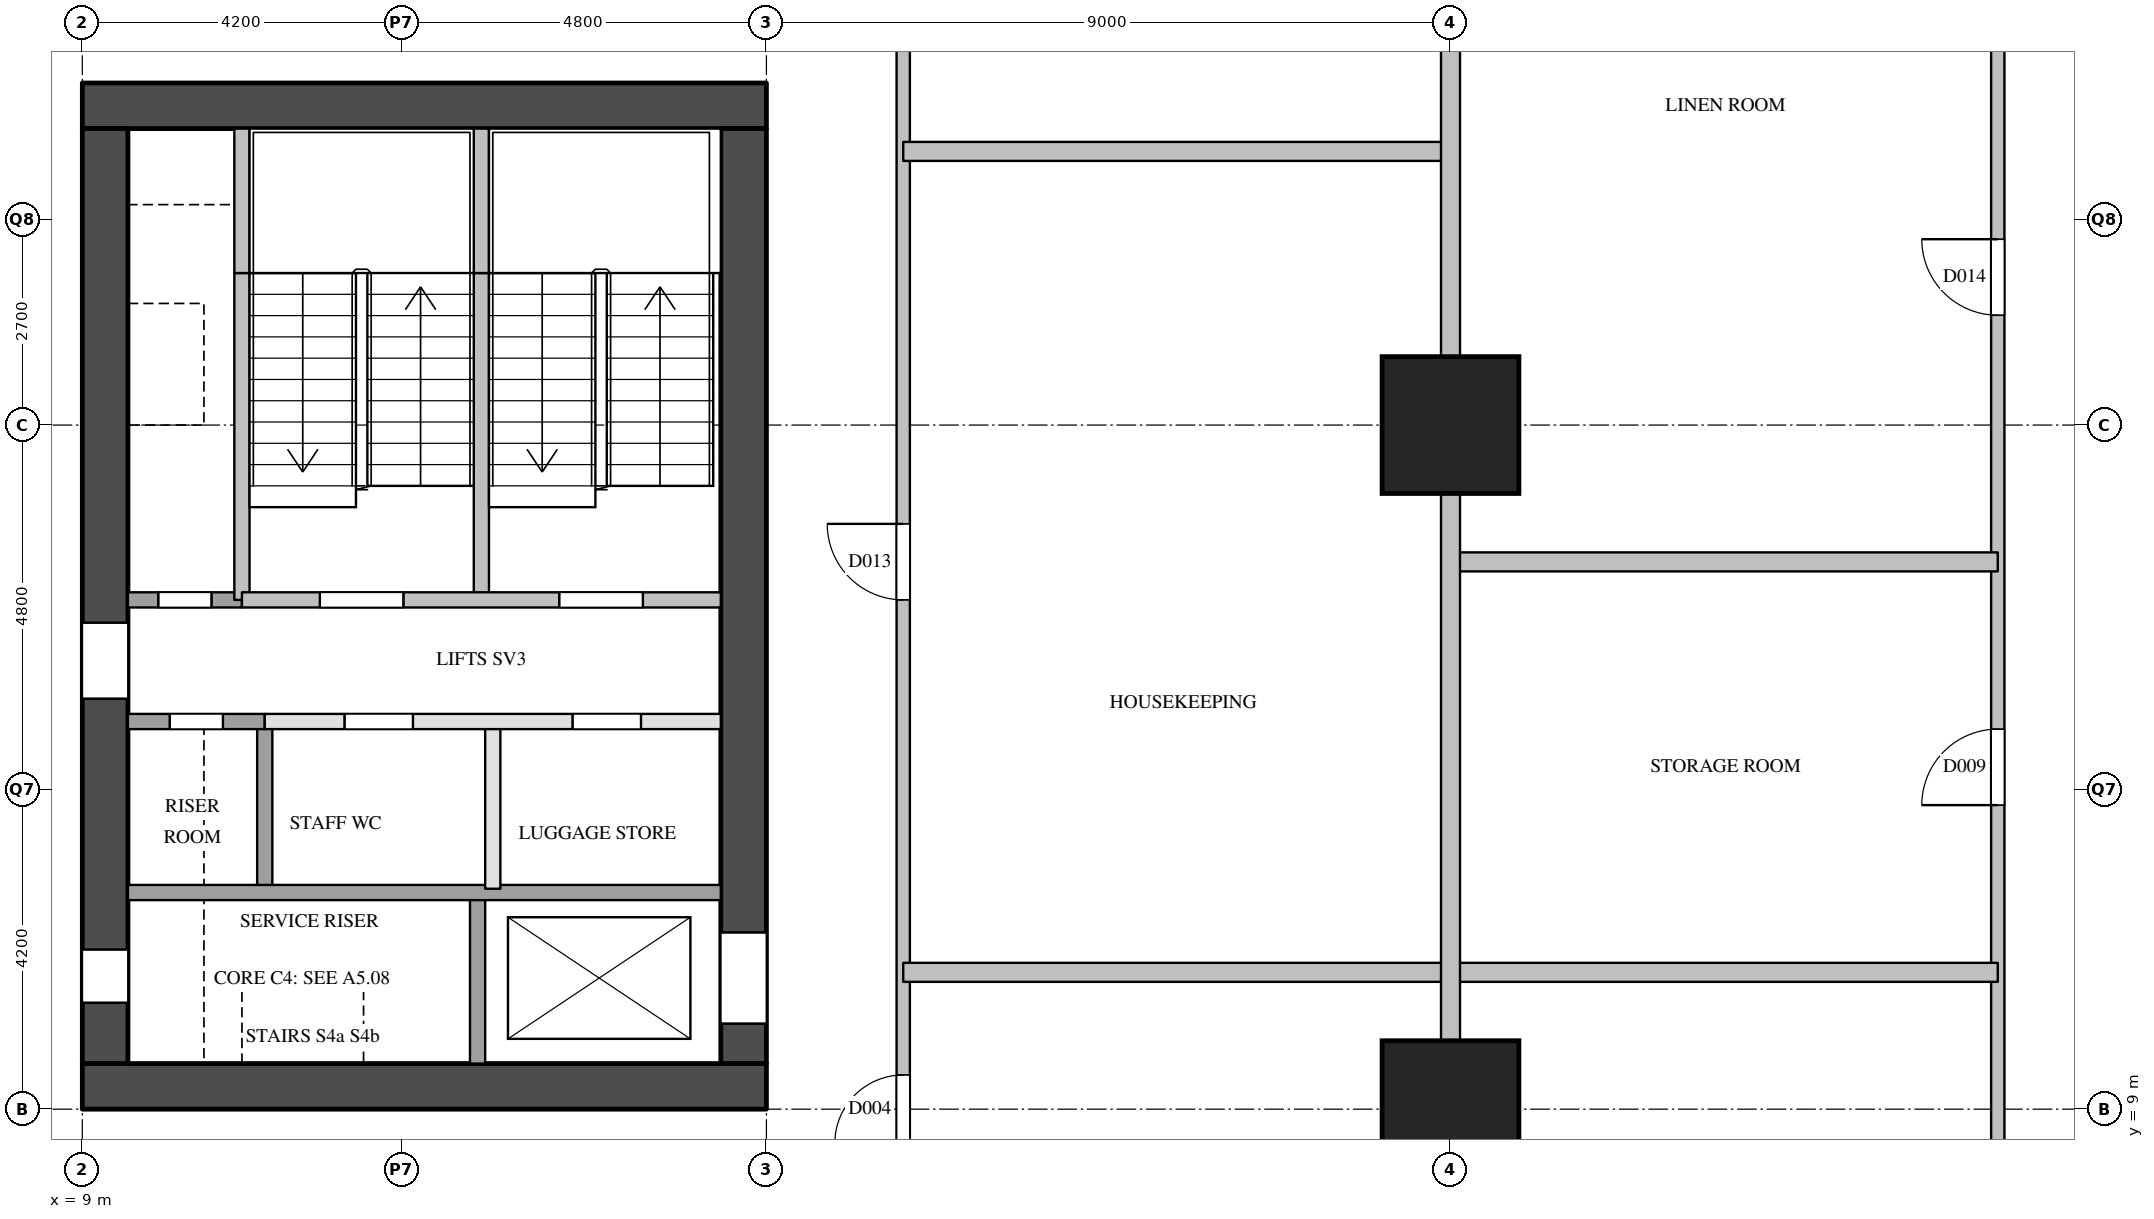
"""IFC4 building model, lengths in metres.
Left out: names, types, materials, properties, quantities, classifications, styles, units other than length and angle.
Written with IfcOpenShell. Run it as: python <this file> out.ifc"""

import sys

from ifc_helpers import new_model, si_unit, direction, frame, frame_2d, origin, origin_2d, place, context, subcontext, project, spatial, rectangle, extrude, element, fill, save


model = new_model("IFC4")
c1 = context("Model", 3, precision=1e-05, world=origin(), true_north=direction((0.0, 1.0)))
c2 = subcontext(c1, "Body", "Model", "MODEL_VIEW")
j1 = project(units=[si_unit("LENGTHUNIT", "METRE"), si_unit("PLANEANGLEUNIT", "RADIAN")], contexts=[c1])
p1 = place(None, origin())
s1 = spatial("IfcSite", under=j1, at=p1, CompositionType="ELEMENT")
p2 = place(p1, origin())
s2 = spatial("IfcBuilding", under=s1, at=p2, CompositionType="ELEMENT")
p3 = place(p2, frame((0.0, 0.0, 31.0)))
s3 = spatial("IfcBuildingStorey", under=s2, at=p3, CompositionType="ELEMENT", Elevation=31.0)
for number, where, z_axis, x_axis in (
    (1, (27.0, 9.0, 0.0), (0.0, 0.0, 1.0), (1.0, 0.0, 0.0)),
    (2, (27.0, 18.0, 0.0), (0.0, 0.0, 1.0), (1.0, 0.0, 0.0)),
):
    element("IfcColumn", number, at=place(p3, frame(where, z_axis=z_axis, x_axis=x_axis)), inside=s3, PredefinedType="COLUMN", context=c2, shape_type="SweptSolid", body=[
        extrude(rectangle(XDim=1.8, YDim=1.8, at=origin_2d()), origin(), (0.0, 0.0, 1.0), 3.8),
    ])
for number, where, z_axis, x_axis in (
    (3, (9.0, 9.3, 0.0), (0.0, 0.0, 1.0), (1.0, 0.0, 0.0)),
    (4, (9.0, 22.2, 0.0), (0.0, 0.0, 1.0), (1.0, 0.0, 0.0)),
):
    element("IfcWall", number, at=place(p3, frame(where, z_axis=z_axis, x_axis=x_axis)), inside=s3, PredefinedType="SHEAR", context=c2, shape_type="SweptSolid", body=[
        extrude(rectangle(XDim=9.0, YDim=0.6, at=frame_2d((4.5, 0.0))), origin(), (0.0, 0.0, 1.0), 3.5),
    ])
p4 = place(p3, frame((9.3, 9.6, 0.0), z_axis=(0.0, 0.0, 1.0), x_axis=(0.0, 1.0, 0.0)))
e5 = element("IfcWall", 5, at=p4, inside=s3, PredefinedType="SHEAR", context=c2, shape_type="SweptSolid", body=[
    extrude(rectangle(XDim=12.3, YDim=0.6, at=frame_2d((6.15, 0.0))), origin(), (0.0, 0.0, 1.0), 3.5),
])
p5 = place(p4, frame((0.8, 0.0, 0.0)))
e6 = element("IfcOpeningElement", 6, at=p5, cuts=e5, PredefinedType="OPENING", context=c2, shape_type="SweptSolid", body=[
    extrude(rectangle(XDim=0.7, YDim=2.1, at=frame_2d((0.35, 1.05))), frame((0.0, 0.31, 0.0), z_axis=(0.0, -1.0, 0.0), x_axis=(1.0, 0.0, 0.0)), (0.0, 0.0, 1.0), 0.62),
])
p6 = place(p4, frame((4.8, 0.0, 0.0)))
e7 = element("IfcOpeningElement", 7, at=p6, cuts=e5, PredefinedType="OPENING", context=c2, shape_type="SweptSolid", body=[
    extrude(rectangle(XDim=1.0, YDim=2.1, at=frame_2d((0.5, 1.05))), frame((0.0, 0.31, 0.0), z_axis=(0.0, -1.0, 0.0), x_axis=(1.0, 0.0, 0.0)), (0.0, 0.0, 1.0), 0.62),
])
p7 = place(p3, frame((17.7, 9.6, 0.0), z_axis=(0.0, 0.0, 1.0), x_axis=(0.0, 1.0, 0.0)))
e8 = element("IfcWall", 8, at=p7, inside=s3, PredefinedType="SHEAR", context=c2, shape_type="SweptSolid", body=[
    extrude(rectangle(XDim=12.3, YDim=0.6, at=frame_2d((6.15, 0.0))), origin(), (0.0, 0.0, 1.0), 3.5),
])
p8 = place(p7, frame((0.525, 0.0, 0.0)))
e9 = element("IfcOpeningElement", 9, at=p8, cuts=e8, PredefinedType="OPENING", context=c2, shape_type="SweptSolid", body=[
    extrude(rectangle(XDim=1.2, YDim=2.1, at=frame_2d((0.6, 1.05))), frame((0.0, 0.31, 0.0), z_axis=(0.0, -1.0, 0.0), x_axis=(1.0, 0.0, 0.0)), (0.0, 0.0, 1.0), 0.62),
])
p9 = place(p3, frame((11.1, 15.7, 0.0), z_axis=(0.0, 0.0, 1.0), x_axis=(0.0, 1.0, 0.0)))
e10 = element("IfcWall", 10, at=p9, inside=s3, PredefinedType="SOLIDWALL", context=c2, shape_type="SweptSolid", body=[
    extrude(rectangle(XDim=4.3, YDim=0.2, at=frame_2d((2.15, 0.0))), origin(), (0.0, 0.0, 1.0), 3.5),
])
p10 = place(p3, frame((11.1, 20.0, 0.0), z_axis=(0.0, 0.0, 1.0), x_axis=(0.0, 1.0, 0.0)))
e11 = element("IfcWall", 11, at=p10, inside=s3, PredefinedType="SOLIDWALL", context=c2, shape_type="SweptSolid", body=[
    extrude(rectangle(XDim=1.9, YDim=0.2, at=frame_2d((0.95, 0.0))), origin(), (0.0, 0.0, 1.0), 3.5),
])
p11 = place(p3, frame((11.4, 11.9, 0.0), z_axis=(0.0, 0.0, 1.0), x_axis=(0.0, 1.0, 0.0)))
e12 = element("IfcWall", 12, at=p11, inside=s3, PredefinedType="SOLIDWALL", context=c2, shape_type="SweptSolid", body=[
    extrude(rectangle(XDim=2.2, YDim=0.2, at=frame_2d((1.1, 0.0))), origin(), (0.0, 0.0, 1.0), 3.5),
])
p12 = place(p3, frame((14.2, 9.6, 0.0), z_axis=(0.0, 0.0, 1.0), x_axis=(0.0, 1.0, 0.0)))
e13 = element("IfcWall", 13, at=p12, inside=s3, PredefinedType="SOLIDWALL", context=c2, shape_type="SweptSolid", body=[
    extrude(rectangle(XDim=2.3, YDim=0.2, at=frame_2d((1.15, 0.0))), origin(), (0.0, 0.0, 1.0), 3.5),
])
p13 = place(p3, frame((14.25, 15.7, 0.0), z_axis=(0.0, 0.0, 1.0), x_axis=(0.0, 1.0, 0.0)))
e14 = element("IfcWall", 14, at=p13, inside=s3, PredefinedType="SOLIDWALL", context=c2, shape_type="SweptSolid", body=[
    extrude(rectangle(XDim=4.3, YDim=0.2, at=frame_2d((2.15, 0.0))), origin(), (0.0, 0.0, 1.0), 3.5),
])
p14 = place(p3, frame((14.25, 20.0, 0.0), z_axis=(0.0, 0.0, 1.0), x_axis=(0.0, 1.0, 0.0)))
e15 = element("IfcWall", 15, at=p14, inside=s3, PredefinedType="SOLIDWALL", context=c2, shape_type="SweptSolid", body=[
    extrude(rectangle(XDim=1.9, YDim=0.2, at=frame_2d((0.95, 0.0))), origin(), (0.0, 0.0, 1.0), 3.5),
])
p15 = place(p3, frame((14.4, 11.9, 0.0), z_axis=(0.0, 0.0, 1.0), x_axis=(0.0, 1.0, 0.0)))
e16 = element("IfcWall", 16, at=p15, inside=s3, PredefinedType="PARTITIONING", context=c2, shape_type="SweptSolid", body=[
    extrude(rectangle(XDim=2.2, YDim=0.2, at=frame_2d((1.1, 0.0))), origin(), (0.0, 0.0, 1.0), 3.5),
])
p16 = place(p3, frame((9.6, 11.85, 0.0), z_axis=(0.0, 0.0, 1.0), x_axis=(1.0, 0.0, 0.0)))
e17 = element("IfcWall", 17, at=p16, inside=s3, PredefinedType="SOLIDWALL", context=c2, shape_type="SweptSolid", body=[
    extrude(rectangle(XDim=7.8, YDim=0.2, at=frame_2d((3.9, 0.0))), origin(), (0.0, 0.0, 1.0), 3.5),
])
p17 = place(p3, frame((11.4, 14.1, 0.0), z_axis=(0.0, 0.0, 1.0), x_axis=(1.0, 0.0, 0.0)))
e18 = element("IfcWall", 18, at=p17, inside=s3, PredefinedType="PARTITIONING", context=c2, shape_type="SweptSolid", body=[
    extrude(rectangle(XDim=6.0, YDim=0.2, at=frame_2d((3.0, 0.0))), origin(), (0.0, 0.0, 1.0), 3.5),
])
p18 = place(p17, frame((1.05, 0.0, 0.0)))
e19 = element("IfcOpeningElement", 19, at=p18, cuts=e18, PredefinedType="OPENING", context=c2, shape_type="SweptSolid", body=[
    extrude(rectangle(XDim=0.9, YDim=2.1, at=frame_2d((0.45, 1.05))), frame((0.0, 0.11, 0.0), z_axis=(0.0, -1.0, 0.0), x_axis=(1.0, 0.0, 0.0)), (0.0, 0.0, 1.0), 0.22),
])
p19 = place(p17, frame((4.05, 0.0, 0.0)))
e20 = element("IfcOpeningElement", 20, at=p19, cuts=e18, PredefinedType="OPENING", context=c2, shape_type="SweptSolid", body=[
    extrude(rectangle(XDim=0.9, YDim=2.1, at=frame_2d((0.45, 1.05))), frame((0.0, 0.11, 0.0), z_axis=(0.0, -1.0, 0.0), x_axis=(1.0, 0.0, 0.0)), (0.0, 0.0, 1.0), 0.22),
])
p20 = place(p3, frame((9.6, 14.1, 0.0), z_axis=(0.0, 0.0, 1.0), x_axis=(1.0, 0.0, 0.0)))
e21 = element("IfcWall", 21, at=p20, inside=s3, PredefinedType="SOLIDWALL", context=c2, shape_type="SweptSolid", body=[
    extrude(rectangle(XDim=1.8, YDim=0.2, at=frame_2d((0.9, 0.0))), origin(), (0.0, 0.0, 1.0), 3.5),
])
p21 = place(p20, frame((0.55, 0.0, 0.0)))
e22 = element("IfcOpeningElement", 22, at=p21, cuts=e21, PredefinedType="OPENING", context=c2, shape_type="SweptSolid", body=[
    extrude(rectangle(XDim=0.7, YDim=2.1, at=frame_2d((0.35, 1.05))), frame((0.0, 0.11, 0.0), z_axis=(0.0, -1.0, 0.0), x_axis=(1.0, 0.0, 0.0)), (0.0, 0.0, 1.0), 0.22),
])
p22 = place(p3, frame((9.6, 15.7, 0.0), z_axis=(0.0, 0.0, 1.0), x_axis=(1.0, 0.0, 0.0)))
e23 = element("IfcWall", 23, at=p22, inside=s3, PredefinedType="SOLIDWALL", context=c2, shape_type="SweptSolid", body=[
    extrude(rectangle(XDim=1.5, YDim=0.2, at=frame_2d((0.75, 0.0))), origin(), (0.0, 0.0, 1.0), 3.5),
])
p23 = place(p22, frame((0.4, 0.0, 0.0)))
e24 = element("IfcOpeningElement", 24, at=p23, cuts=e23, PredefinedType="OPENING", context=c2, shape_type="SweptSolid", body=[
    extrude(rectangle(XDim=0.7, YDim=2.1, at=frame_2d((0.35, 1.05))), frame((0.0, 0.11, 0.0), z_axis=(0.0, -1.0, 0.0), x_axis=(1.0, 0.0, 0.0)), (0.0, 0.0, 1.0), 0.22),
])
p24 = place(p3, frame((11.1, 15.7, 0.0), z_axis=(0.0, 0.0, 1.0), x_axis=(1.0, 0.0, 0.0)))
e25 = element("IfcWall", 25, at=p24, inside=s3, PredefinedType="SOLIDWALL", context=c2, shape_type="SweptSolid", body=[
    extrude(rectangle(XDim=6.3, YDim=0.2, at=frame_2d((3.15, 0.0))), origin(), (0.0, 0.0, 1.0), 3.5),
])
p25 = place(p24, frame((4.175, 0.0, 0.0)))
e26 = element("IfcOpeningElement", 26, at=p25, cuts=e25, PredefinedType="OPENING", context=c2, shape_type="SweptSolid", body=[
    extrude(rectangle(XDim=1.1, YDim=2.1, at=frame_2d((0.55, 1.05))), frame((0.0, 0.11, 0.0), z_axis=(0.0, -1.0, 0.0), x_axis=(1.0, 0.0, 0.0)), (0.0, 0.0, 1.0), 0.22),
])
p26 = place(p24, frame((1.025, 0.0, 0.0)))
e27 = element("IfcOpeningElement", 27, at=p26, cuts=e25, PredefinedType="OPENING", context=c2, shape_type="SweptSolid", body=[
    extrude(rectangle(XDim=1.1, YDim=2.1, at=frame_2d((0.55, 1.05))), frame((0.0, 0.11, 0.0), z_axis=(0.0, -1.0, 0.0), x_axis=(1.0, 0.0, 0.0)), (0.0, 0.0, 1.0), 0.22),
])
p27 = place(p3, frame((19.8, 7.2, 0.0), z_axis=(0.0, 0.0, 1.0), x_axis=(0.0, 1.0, 0.0)))
e28 = element("IfcWall", 28, at=p27, inside=s3, PredefinedType="PARTITIONING", context=c2, shape_type="SweptSolid", body=[
    extrude(rectangle(XDim=16.49, YDim=0.175, at=frame_2d((8.245, 0.0))), origin(), (0.0, 0.0, 1.0), 3.5),
])
p28 = place(p27, frame((1.35, 0.0, 0.0)))
e29 = element("IfcOpeningElement", 29, at=p28, cuts=e28, PredefinedType="OPENING", context=c2, shape_type="SweptSolid", body=[
    extrude(rectangle(XDim=0.9, YDim=2.1, at=frame_2d((0.45, 1.05))), frame((0.0, 0.097, 0.0), z_axis=(0.0, -1.0, 0.0), x_axis=(1.0, 0.0, 0.0)), (0.0, 0.0, 1.0), 0.195),
])
p29 = place(p27, frame((8.5, 0.0, 0.0)))
e30 = element("IfcOpeningElement", 30, at=p29, cuts=e28, PredefinedType="OPENING", context=c2, shape_type="SweptSolid", body=[
    extrude(rectangle(XDim=1.0, YDim=2.1, at=frame_2d((0.5, 1.05))), frame((0.0, 0.097, 0.0), z_axis=(0.0, -1.0, 0.0), x_axis=(1.0, 0.0, 0.0)), (0.0, 0.0, 1.0), 0.195),
])
p30 = place(p3, frame((34.2, 7.2, 0.0), z_axis=(0.0, 0.0, 1.0), x_axis=(0.0, 1.0, 0.0)))
e31 = element("IfcWall", 31, at=p30, inside=s3, PredefinedType="PARTITIONING", context=c2, shape_type="SweptSolid", body=[
    extrude(rectangle(XDim=16.49, YDim=0.175, at=frame_2d((8.245, 0.0))), origin(), (0.0, 0.0, 1.0), 3.5),
])
p31 = place(p30, frame((5.8, 0.0, 0.0)))
e32 = element("IfcOpeningElement", 32, at=p31, cuts=e31, PredefinedType="OPENING", context=c2, shape_type="SweptSolid", body=[
    extrude(rectangle(XDim=1.0, YDim=2.1, at=frame_2d((0.5, 1.05))), frame((0.0, 0.097, 0.0), z_axis=(0.0, -1.0, 0.0), x_axis=(1.0, 0.0, 0.0)), (0.0, 0.0, 1.0), 0.195),
])
p32 = place(p30, frame((12.245, 0.0, 0.0)))
e33 = element("IfcOpeningElement", 33, at=p32, cuts=e31, PredefinedType="OPENING", context=c2, shape_type="SweptSolid", body=[
    extrude(rectangle(XDim=1.0, YDim=2.1, at=frame_2d((0.5, 1.05))), frame((0.0, 0.097, 0.0), z_axis=(0.0, -1.0, 0.0), x_axis=(1.0, 0.0, 0.0)), (0.0, 0.0, 1.0), 0.195),
])
p33 = place(p3, frame((19.8, 10.8, 0.0), z_axis=(0.0, 0.0, 1.0), x_axis=(1.0, 0.0, 0.0)))
e34 = element("IfcWall", 34, at=p33, inside=s3, PredefinedType="PARTITIONING", context=c2, shape_type="SweptSolid", body=[
    extrude(rectangle(XDim=14.4, YDim=0.25, at=frame_2d((7.2, 0.0))), origin(), (0.0, 0.0, 1.0), 2.5),
])
for number, where, z_axis, x_axis in (
    (35, (27.0, 16.2, 0.0), (0.0, 0.0, 1.0), (1.0, 0.0, 0.0)),
    (36, (19.8, 21.6, 0.0), (0.0, 0.0, 1.0), (1.0, 0.0, 0.0)),
):
    element("IfcWall", number, at=place(p3, frame(where, z_axis=z_axis, x_axis=x_axis)), inside=s3, PredefinedType="PARTITIONING", context=c2, shape_type="SweptSolid", body=[
        extrude(rectangle(XDim=7.2, YDim=0.25, at=frame_2d((3.6, 0.0))), origin(), (0.0, 0.0, 1.0), 2.5),
    ])
p34 = place(p3, frame((27.0, 0.0, 0.0), z_axis=(0.0, 0.0, 1.0), x_axis=(0.0, 1.0, 0.0)))
e37 = element("IfcWall", 37, at=p34, inside=s3, PredefinedType="PARTITIONING", context=c2, shape_type="SweptSolid", body=[
    extrude(rectangle(XDim=37.925, YDim=0.25, at=frame_2d((18.962, 0.0))), origin(), (0.0, 0.0, 1.0), 2.5),
])
p35 = place(p8, origin())
e38 = element("IfcDoor", 38, at=p35, inside=s3, OperationType="SLIDING_TO_LEFT", PredefinedType="DOOR", context=c2, shape_type="SweptSolid", body=[
    extrude(rectangle(XDim=1.2, YDim=2.1, at=frame_2d((0.6, 1.05))), frame((0.0, 0.025, 0.0), z_axis=(0.0, -1.0, 0.0), x_axis=(1.0, 0.0, 0.0)), (0.0, 0.0, 1.0), 0.05),
])
fill(e9, e38)
p36 = place(p25, origin())
e39 = element("IfcDoor", 39, at=p36, inside=s3, OperationType="SINGLE_SWING_RIGHT", PredefinedType="DOOR", context=c2, shape_type="SweptSolid", body=[
    extrude(rectangle(XDim=1.1, YDim=2.1, at=frame_2d((0.55, 1.05))), frame((0.0, 0.025, 0.0), z_axis=(0.0, -1.0, 0.0), x_axis=(1.0, 0.0, 0.0)), (0.0, 0.0, 1.0), 0.05),
])
fill(e26, e39)
p37 = place(p26, origin())
e40 = element("IfcDoor", 40, at=p37, inside=s3, OperationType="SINGLE_SWING_LEFT", PredefinedType="DOOR", context=c2, shape_type="SweptSolid", body=[
    extrude(rectangle(XDim=1.1, YDim=2.1, at=frame_2d((0.55, 1.05))), frame((0.0, 0.025, 0.0), z_axis=(0.0, -1.0, 0.0), x_axis=(1.0, 0.0, 0.0)), (0.0, 0.0, 1.0), 0.05),
])
fill(e27, e40)
p38 = place(p23, origin())
e41 = element("IfcDoor", 41, at=p38, inside=s3, OperationType="SINGLE_SWING_LEFT", PredefinedType="DOOR", context=c2, shape_type="SweptSolid", body=[
    extrude(rectangle(XDim=0.7, YDim=2.1, at=frame_2d((0.35, 1.05))), frame((0.0, 0.025, 0.0), z_axis=(0.0, -1.0, 0.0), x_axis=(1.0, 0.0, 0.0)), (0.0, 0.0, 1.0), 0.05),
])
fill(e24, e41)
p39 = place(p21, origin())
e42 = element("IfcDoor", 42, at=p39, inside=s3, OperationType="SINGLE_SWING_LEFT", PredefinedType="DOOR", context=c2, shape_type="SweptSolid", body=[
    extrude(rectangle(XDim=0.7, YDim=2.1, at=frame_2d((0.35, 1.05))), frame((0.0, 0.025, 0.0), z_axis=(0.0, -1.0, 0.0), x_axis=(1.0, 0.0, 0.0)), (0.0, 0.0, 1.0), 0.05),
])
fill(e22, e42)
p40 = place(p5, origin())
e43 = element("IfcDoor", 43, at=p40, inside=s3, OperationType="SINGLE_SWING_LEFT", PredefinedType="DOOR", context=c2, shape_type="SweptSolid", body=[
    extrude(rectangle(XDim=0.7, YDim=2.1, at=frame_2d((0.35, 1.05))), frame((0.0, 0.025, 0.0), z_axis=(0.0, -1.0, 0.0), x_axis=(1.0, 0.0, 0.0)), (0.0, 0.0, 1.0), 0.05),
])
fill(e6, e43)
p41 = place(p6, origin())
e44 = element("IfcDoor", 44, at=p41, inside=s3, OperationType="SINGLE_SWING_LEFT", PredefinedType="DOOR", context=c2, shape_type="SweptSolid", body=[
    extrude(rectangle(XDim=1.0, YDim=2.1, at=frame_2d((0.5, 1.05))), frame((0.0, 0.025, 0.0), z_axis=(0.0, -1.0, 0.0), x_axis=(1.0, 0.0, 0.0)), (0.0, 0.0, 1.0), 0.05),
])
fill(e7, e44)
p42 = place(p18, origin())
e45 = element("IfcDoor", 45, at=p42, inside=s3, OperationType="SINGLE_SWING_LEFT", PredefinedType="DOOR", context=c2, shape_type="SweptSolid", body=[
    extrude(rectangle(XDim=0.9, YDim=2.1, at=frame_2d((0.45, 1.05))), frame((0.0, 0.025, 0.0), z_axis=(0.0, -1.0, 0.0), x_axis=(1.0, 0.0, 0.0)), (0.0, 0.0, 1.0), 0.05),
])
fill(e19, e45)
p43 = place(p19, origin())
e46 = element("IfcDoor", 46, at=p43, inside=s3, OperationType="SINGLE_SWING_RIGHT", PredefinedType="DOOR", context=c2, shape_type="SweptSolid", body=[
    extrude(rectangle(XDim=0.9, YDim=2.1, at=frame_2d((0.45, 1.05))), frame((0.0, 0.025, 0.0), z_axis=(0.0, -1.0, 0.0), x_axis=(1.0, 0.0, 0.0)), (0.0, 0.0, 1.0), 0.05),
])
fill(e20, e46)
p44 = place(p28, origin())
e47 = element("IfcDoor", 47, at=p44, inside=s3, OperationType="SINGLE_SWING_LEFT", PredefinedType="DOOR", context=c2, shape_type="SweptSolid", body=[
    extrude(rectangle(XDim=0.9, YDim=2.1, at=frame_2d((0.45, 1.05))), frame((0.0, 0.025, 0.0), z_axis=(0.0, -1.0, 0.0), x_axis=(1.0, 0.0, 0.0)), (0.0, 0.0, 1.0), 0.05),
])
fill(e29, e47)
p45 = place(p31, origin())
e48 = element("IfcDoor", 48, at=p45, inside=s3, OperationType="SINGLE_SWING_LEFT", PredefinedType="DOOR", context=c2, shape_type="SweptSolid", body=[
    extrude(rectangle(XDim=1.0, YDim=2.1, at=frame_2d((0.5, 1.05))), frame((0.0, 0.025, 0.0), z_axis=(0.0, -1.0, 0.0), x_axis=(1.0, 0.0, 0.0)), (0.0, 0.0, 1.0), 0.05),
])
fill(e32, e48)
p46 = place(p29, origin())
e49 = element("IfcDoor", 49, at=p46, inside=s3, OperationType="SINGLE_SWING_RIGHT", PredefinedType="DOOR", context=c2, shape_type="SweptSolid", body=[
    extrude(rectangle(XDim=1.0, YDim=2.1, at=frame_2d((0.5, 1.05))), frame((0.0, 0.025, 0.0), z_axis=(0.0, -1.0, 0.0), x_axis=(1.0, 0.0, 0.0)), (0.0, 0.0, 1.0), 0.05),
])
fill(e30, e49)
p47 = place(p32, origin())
e50 = element("IfcDoor", 50, at=p47, inside=s3, OperationType="SINGLE_SWING_RIGHT", PredefinedType="DOOR", context=c2, shape_type="SweptSolid", body=[
    extrude(rectangle(XDim=1.0, YDim=2.1, at=frame_2d((0.5, 1.05))), frame((0.0, 0.025, 0.0), z_axis=(0.0, -1.0, 0.0), x_axis=(1.0, 0.0, 0.0)), (0.0, 0.0, 1.0), 0.05),
])
fill(e33, e50)
save(model, sys.argv[1])
